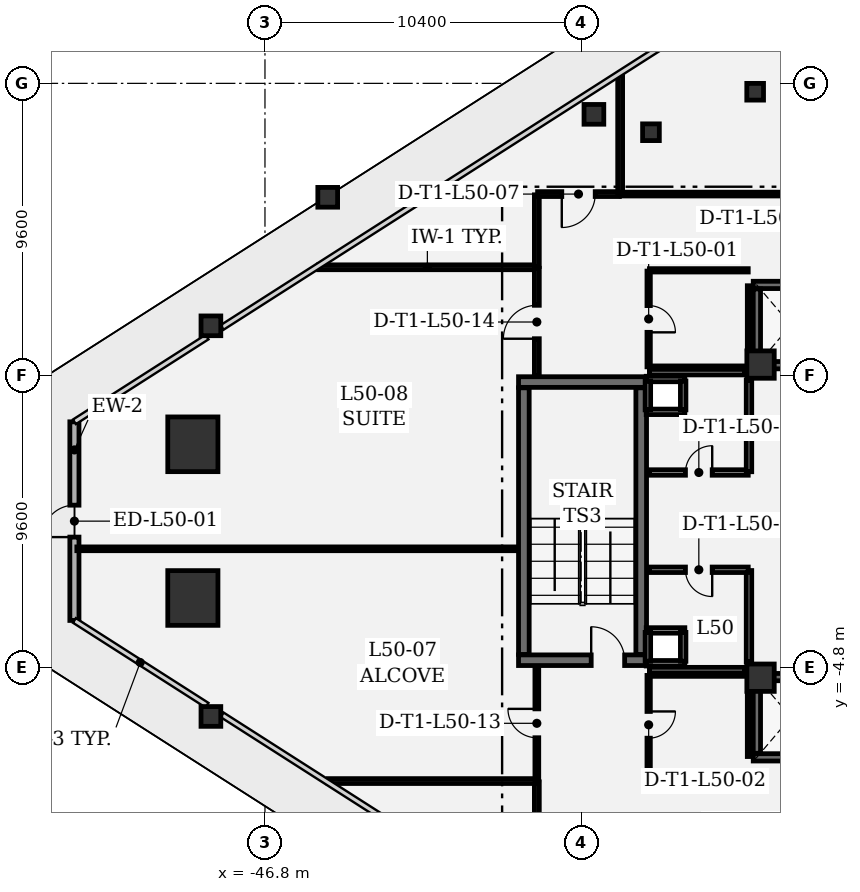
"""IFC4 building model, lengths in metres.
Left out: names, types, materials, properties, quantities, classifications, styles, units other than length and angle.
Written with IfcOpenShell. Run it as: python <this file> out.ifc"""

import sys

from ifc_helpers import new_model, si_unit, direction, frame, frame_2d, origin, origin_2d, place, context, subcontext, project, spatial, rectangle, extrude, element, fill, save


model = new_model("IFC4")
c1 = context("Model", 3, precision=1e-05, world=origin(), true_north=direction((0.0, 1.0)))
c2 = subcontext(c1, "Body", "Model", "MODEL_VIEW")
j1 = project(units=[si_unit("LENGTHUNIT", "METRE"), si_unit("PLANEANGLEUNIT", "RADIAN")], contexts=[c1])
p1 = place(None, origin())
s1 = spatial("IfcSite", under=j1, at=p1, CompositionType="ELEMENT")
p2 = place(p1, origin())
s2 = spatial("IfcBuilding", under=s1, at=p2, CompositionType="ELEMENT")
p3 = place(p2, frame((0.0, 0.0, 217.2)))
s3 = spatial("IfcBuildingStorey", under=s2, at=p3, CompositionType="ELEMENT", Elevation=217.2)
for number, where, z_axis, x_axis in (
    (1, (-49.172, 2.528, 0.0), (0.0, 0.0, 1.0), (1.0, 0.0, 0.0)),
    (2, (-49.172, -2.528, 0.0), (0.0, 0.0, 1.0), (1.0, 0.0, 0.0)),
):
    element("IfcColumn", number, at=place(p3, frame(where, z_axis=z_axis, x_axis=x_axis)), inside=s3, PredefinedType="COLUMN", context=c2, shape_type="SweptSolid", body=[
        extrude(rectangle(XDim=1.65, YDim=1.8, at=origin_2d()), origin(), (0.0, 0.0, 1.0), 4.05),
    ])
for number, where, z_axis, x_axis in (
    (3, (-30.5, 5.15, 0.0), (0.0, 0.0, 1.0), (1.0, 0.0, 0.0)),
    (4, (-30.5, -5.15, 0.0), (0.0, 0.0, 1.0), (1.0, 0.0, 0.0)),
):
    element("IfcColumn", number, at=place(p3, frame(where, z_axis=z_axis, x_axis=x_axis)), inside=s3, PredefinedType="COLUMN", context=c2, shape_type="SweptSolid", body=[
        extrude(rectangle(XDim=0.9, YDim=0.9, at=origin_2d()), origin(), (0.0, 0.0, 1.0), 4.05),
    ])
for number, where, z_axis, x_axis in (
    (5, (-44.736, 10.652, 0.0), (0.0, 0.0, 1.0), (1.0, 0.0, 0.0)),
    (6, (-48.578, 6.425, 0.0), (0.0, 0.0, 1.0), (1.0, 0.0, 0.0)),
    (7, (-48.578, -6.425, 0.0), (0.0, 0.0, 1.0), (1.0, 0.0, 0.0)),
    (8, (-35.981, 13.381, 0.0), (0.0, 0.0, 1.0), (1.0, 0.0, 0.0)),
):
    element("IfcColumn", number, at=place(p3, frame(where, z_axis=z_axis, x_axis=x_axis)), inside=s3, PredefinedType="COLUMN", context=c2, shape_type="SweptSolid", body=[
        extrude(rectangle(XDim=0.65, YDim=0.65, at=origin_2d()), origin(), (0.0, 0.0, 1.0), 4.05),
    ])
for number, where, z_axis, x_axis in (
    (9, (-34.104, 12.792, 0.0), (0.0, 0.0, 1.0), (1.0, 0.0, 0.0)),
    (10, (-30.677, 14.124, 0.0), (0.0, 0.0, 1.0), (1.0, 0.0, 0.0)),
):
    element("IfcColumn", number, at=place(p3, frame(where, z_axis=z_axis, x_axis=x_axis)), inside=s3, PredefinedType="COLUMN", context=c2, shape_type="SweptSolid", body=[
        extrude(rectangle(XDim=0.55, YDim=0.55, at=origin_2d()), origin(), (0.0, 0.0, 1.0), 4.05),
    ])
p4 = place(p3, frame((-53.068, -3.267, 0.0), z_axis=(0.0, 0.0, 1.0), x_axis=(0.0, 1.0, 0.0)))
e11 = element("IfcWall", 11, at=p4, inside=s3, PredefinedType="SOLIDWALL", context=c2, shape_type="SweptSolid", body=[
    extrude(rectangle(XDim=6.534, YDim=0.3, at=frame_2d((3.267, 0.0))), origin(), (0.0, 0.0, 1.0), 3.78),
])
p5 = place(p4, frame((2.742, 0.0, 0.0)))
e12 = element("IfcOpeningElement", 12, at=p5, cuts=e11, PredefinedType="OPENING", context=c2, shape_type="SweptSolid", body=[
    extrude(rectangle(XDim=1.05, YDim=2.2, at=frame_2d((0.525, 1.1))), frame((0.0, 0.16, 0.0), z_axis=(0.0, -1.0, 0.0), x_axis=(1.0, 0.0, 0.0)), (0.0, 0.0, 1.0), 0.32),
])
p6 = place(p3, frame((-38.46, -4.575, 0.0), z_axis=(0.0, 0.0, 1.0), x_axis=(1.0, 0.0, 0.0)))
e13 = element("IfcWall", 13, at=p6, inside=s3, PredefinedType="SHEAR", context=c2, shape_type="SweptSolid", body=[
    extrude(rectangle(XDim=4.21, YDim=0.35, at=frame_2d((2.105, 0.0))), origin(), (0.0, 0.0, 1.0), 3.78),
])
p7 = place(p6, frame((2.39, 0.0, 0.0)))
e14 = element("IfcOpeningElement", 14, at=p7, cuts=e13, PredefinedType="OPENING", context=c2, shape_type="SweptSolid", body=[
    extrude(rectangle(XDim=1.1, YDim=2.2, at=frame_2d((0.55, 1.1))), frame((0.0, 0.185, 0.0), z_axis=(0.0, -1.0, 0.0), x_axis=(1.0, 0.0, 0.0)), (0.0, 0.0, 1.0), 0.37),
])
p8 = place(p3, frame((-34.25, 4.575, 0.0), z_axis=(0.0, 0.0, 1.0), x_axis=(-1.0, 0.0, 0.0)))
e15 = element("IfcWall", 15, at=p8, inside=s3, PredefinedType="SHEAR", context=c2, shape_type="SweptSolid", body=[
    extrude(rectangle(XDim=4.21, YDim=0.35, at=frame_2d((2.105, 0.0))), origin(), (0.0, 0.0, 1.0), 3.78),
])
for number, where, z_axis, x_axis in (
    (16, (-34.425, -4.385, 0.0), (0.0, 0.0, 1.0), (0.0, 1.0, 0.0)),
    (17, (-38.285, 4.385, 0.0), (0.0, 0.0, 1.0), (0.0, -1.0, 0.0)),
):
    element("IfcWall", number, at=place(p3, frame(where, z_axis=z_axis, x_axis=x_axis)), inside=s3, PredefinedType="SHEAR", context=c2, shape_type="SweptSolid", body=[
        extrude(rectangle(XDim=8.77, YDim=0.35, at=frame_2d((4.385, 0.0))), origin(), (0.0, 0.0, 1.0), 3.78),
    ])
for number, where, z_axis, x_axis in (
    (18, (-28.26, 5.13, 0.0), (0.0, 0.0, 1.0), (-1.0, 0.0, 0.0)),
    (19, (-30.74, 7.77, 0.0), (0.0, 0.0, 1.0), (1.0, 0.0, 0.0)),
):
    element("IfcWall", number, at=place(p3, frame(where, z_axis=z_axis, x_axis=x_axis)), inside=s3, PredefinedType="SHEAR", context=c2, shape_type="SweptSolid", body=[
        extrude(rectangle(XDim=2.48, YDim=0.24, at=frame_2d((1.24, 0.0))), origin(), (0.0, 0.0, 1.0), 3.78),
    ])
p9 = place(p3, frame((-30.62, 5.262, 0.0), z_axis=(0.0, 0.0, 1.0), x_axis=(0.0, 1.0, 0.0)))
e20 = element("IfcWall", 20, at=p9, inside=s3, PredefinedType="SHEAR", context=c2, shape_type="SweptSolid", body=[
    extrude(rectangle(XDim=2.376, YDim=0.24, at=frame_2d((1.188, 0.0))), origin(), (0.0, 0.0, 1.0), 3.78),
])
for number, where, z_axis, x_axis in (
    (21, (-28.26, -7.77, 0.0), (0.0, 0.0, 1.0), (-1.0, 0.0, 0.0)),
    (22, (-30.74, -5.13, 0.0), (0.0, 0.0, 1.0), (1.0, 0.0, 0.0)),
):
    element("IfcWall", number, at=place(p3, frame(where, z_axis=z_axis, x_axis=x_axis)), inside=s3, PredefinedType="SHEAR", context=c2, shape_type="SweptSolid", body=[
        extrude(rectangle(XDim=2.48, YDim=0.24, at=frame_2d((1.24, 0.0))), origin(), (0.0, 0.0, 1.0), 3.78),
    ])
p10 = place(p3, frame((-30.62, -7.638, 0.0), z_axis=(0.0, 0.0, 1.0), x_axis=(0.0, 1.0, 0.0)))
e23 = element("IfcWall", 23, at=p10, inside=s3, PredefinedType="SHEAR", context=c2, shape_type="SweptSolid", body=[
    extrude(rectangle(XDim=2.376, YDim=0.24, at=frame_2d((1.188, 0.0))), origin(), (0.0, 0.0, 1.0), 3.78),
])
for number, where, z_axis, x_axis in (
    (24, (-32.99, 3.595, 0.0), (0.0, 0.0, 1.0), (-1.0, 0.0, 0.0)),
    (25, (-34.26, 4.675, 0.0), (0.0, 0.0, 1.0), (1.0, 0.0, 0.0)),
):
    element("IfcWall", number, at=place(p3, frame(where, z_axis=z_axis, x_axis=x_axis)), inside=s3, PredefinedType="PARTITIONING", context=c2, shape_type="SweptSolid", body=[
        extrude(rectangle(XDim=1.27, YDim=0.18, at=frame_2d((0.635, 0.0))), origin(), (0.0, 0.0, 1.0), 3.78),
    ])
for number, where, z_axis, x_axis in (
    (26, (-34.205, 3.66, 0.0), (0.0, 0.0, 1.0), (0.0, 1.0, 0.0)),
    (27, (-33.045, 4.61, 0.0), (0.0, 0.0, 1.0), (0.0, -1.0, 0.0)),
):
    element("IfcWall", number, at=place(p3, frame(where, z_axis=z_axis, x_axis=x_axis)), inside=s3, PredefinedType="PARTITIONING", context=c2, shape_type="SweptSolid", body=[
        extrude(rectangle(XDim=0.95, YDim=0.18, at=frame_2d((0.475, 0.0))), origin(), (0.0, 0.0, 1.0), 3.78),
    ])
for number, where, z_axis, x_axis in (
    (28, (-32.99, -4.675, 0.0), (0.0, 0.0, 1.0), (-1.0, 0.0, 0.0)),
    (29, (-34.26, -3.595, 0.0), (0.0, 0.0, 1.0), (1.0, 0.0, 0.0)),
):
    element("IfcWall", number, at=place(p3, frame(where, z_axis=z_axis, x_axis=x_axis)), inside=s3, PredefinedType="PARTITIONING", context=c2, shape_type="SweptSolid", body=[
        extrude(rectangle(XDim=1.27, YDim=0.18, at=frame_2d((0.635, 0.0))), origin(), (0.0, 0.0, 1.0), 3.78),
    ])
for number, where, z_axis, x_axis in (
    (30, (-34.205, -4.61, 0.0), (0.0, 0.0, 1.0), (0.0, 1.0, 0.0)),
    (31, (-33.045, -3.66, 0.0), (0.0, 0.0, 1.0), (0.0, -1.0, 0.0)),
):
    element("IfcWall", number, at=place(p3, frame(where, z_axis=z_axis, x_axis=x_axis)), inside=s3, PredefinedType="PARTITIONING", context=c2, shape_type="SweptSolid", body=[
        extrude(rectangle(XDim=0.95, YDim=0.18, at=frame_2d((0.475, 0.0))), origin(), (0.0, 0.0, 1.0), 3.78),
    ])
p11 = place(p3, frame((-34.18, 8.225, 0.0), z_axis=(0.0, 0.0, 1.0), x_axis=(0.0, -1.0, 0.0)))
e32 = element("IfcWall", 32, at=p11, inside=s3, PredefinedType="PARTITIONING", context=c2, shape_type="SweptSolid", body=[
    extrude(rectangle(XDim=3.15, YDim=0.11, at=frame_2d((1.575, 0.0))), origin(), (0.0, 0.0, 1.0), 3.78),
])
p12 = place(p11, frame((1.135, 0.0, 0.0)))
e33 = element("IfcOpeningElement", 33, at=p12, cuts=e32, PredefinedType="OPENING", context=c2, shape_type="SweptSolid", body=[
    extrude(rectangle(XDim=0.88, YDim=2.1, at=frame_2d((0.44, 1.05))), frame((0.0, 0.065, 0.0), z_axis=(0.0, -1.0, 0.0), x_axis=(1.0, 0.0, 0.0)), (0.0, 0.0, 1.0), 0.13),
])
p13 = place(p3, frame((-34.155, 5.05, 0.0), z_axis=(0.0, 0.0, 1.0), x_axis=(1.0, 0.0, 0.0)))
e34 = element("IfcWall", 34, at=p13, inside=s3, PredefinedType="PARTITIONING", context=c2, shape_type="SweptSolid", body=[
    extrude(rectangle(XDim=3.14, YDim=0.11, at=frame_2d((1.57, 0.0))), origin(), (0.0, 0.0, 1.0), 3.78),
])
p14 = place(p3, frame((-30.88, 5.665, 0.0), z_axis=(0.0, 0.0, 1.0), x_axis=(0.0, 1.0, 0.0)))
e35 = element("IfcWall", 35, at=p14, inside=s3, PredefinedType="PARTITIONING", context=c2, shape_type="SweptSolid", body=[
    extrude(rectangle(XDim=2.078, YDim=0.11, at=frame_2d((1.039, 0.0))), origin(), (0.0, 0.0, 1.0), 3.78),
])
p15 = place(p3, frame((-30.905, 8.25, 0.0), z_axis=(0.0, 0.0, 1.0), x_axis=(-1.0, 0.0, 0.0)))
e36 = element("IfcWall", 36, at=p15, inside=s3, PredefinedType="PARTITIONING", context=c2, shape_type="SweptSolid", body=[
    extrude(rectangle(XDim=3.25, YDim=0.11, at=frame_2d((1.625, 0.0))), origin(), (0.0, 0.0, 1.0), 3.78),
])
p16 = place(p3, frame((-34.155, -8.35, 0.0), z_axis=(0.0, 0.0, 1.0), x_axis=(1.0, 0.0, 0.0)))
e37 = element("IfcWall", 37, at=p16, inside=s3, PredefinedType="PARTITIONING", context=c2, shape_type="SweptSolid", body=[
    extrude(rectangle(XDim=3.25, YDim=0.11, at=frame_2d((1.625, 0.0))), origin(), (0.0, 0.0, 1.0), 3.344),
])
p17 = place(p3, frame((-30.88, -7.743, 0.0), z_axis=(0.0, 0.0, 1.0), x_axis=(0.0, 1.0, 0.0)))
e38 = element("IfcWall", 38, at=p17, inside=s3, PredefinedType="PARTITIONING", context=c2, shape_type="SweptSolid", body=[
    extrude(rectangle(XDim=2.078, YDim=0.11, at=frame_2d((1.039, 0.0))), origin(), (0.0, 0.0, 1.0), 3.78),
])
p18 = place(p3, frame((-31.015, -5.05, 0.0), z_axis=(0.0, 0.0, 1.0), x_axis=(-1.0, 0.0, 0.0)))
e39 = element("IfcWall", 39, at=p18, inside=s3, PredefinedType="PARTITIONING", context=c2, shape_type="SweptSolid", body=[
    extrude(rectangle(XDim=3.14, YDim=0.11, at=frame_2d((1.57, 0.0))), origin(), (0.0, 0.0, 1.0), 3.78),
])
p19 = place(p3, frame((-34.18, -5.075, 0.0), z_axis=(0.0, 0.0, 1.0), x_axis=(0.0, -1.0, 0.0)))
e40 = element("IfcWall", 40, at=p19, inside=s3, PredefinedType="PARTITIONING", context=c2, shape_type="SweptSolid", body=[
    extrude(rectangle(XDim=3.25, YDim=0.11, at=frame_2d((1.625, 0.0))), origin(), (0.0, 0.0, 1.0), 3.78),
])
p20 = place(p19, frame((1.185, 0.0, 0.0)))
e41 = element("IfcOpeningElement", 41, at=p20, cuts=e40, PredefinedType="OPENING", context=c2, shape_type="SweptSolid", body=[
    extrude(rectangle(XDim=0.88, YDim=2.1, at=frame_2d((0.44, 1.05))), frame((0.0, 0.065, 0.0), z_axis=(0.0, -1.0, 0.0), x_axis=(1.0, 0.0, 0.0)), (0.0, 0.0, 1.0), 0.13),
])
p21 = place(p3, frame((-34.155, 1.6, 0.0), z_axis=(0.0, 0.0, 1.0), x_axis=(1.0, 0.0, 0.0)))
e42 = element("IfcWall", 42, at=p21, inside=s3, PredefinedType="PARTITIONING", context=c2, shape_type="SweptSolid", body=[
    extrude(rectangle(XDim=3.25, YDim=0.18, at=frame_2d((1.625, 0.0))), origin(), (0.0, 0.0, 1.0), 3.78),
])
p22 = place(p21, frame((1.185, 0.0, 0.0)))
e43 = element("IfcOpeningElement", 43, at=p22, cuts=e42, PredefinedType="OPENING", context=c2, shape_type="SweptSolid", body=[
    extrude(rectangle(XDim=0.88, YDim=2.1, at=frame_2d((0.44, 1.05))), frame((0.0, 0.1, 0.0), z_axis=(0.0, -1.0, 0.0), x_axis=(1.0, 0.0, 0.0)), (0.0, 0.0, 1.0), 0.2),
])
p23 = place(p3, frame((-30.88, 1.625, 0.0), z_axis=(0.0, 0.0, 1.0), x_axis=(0.0, 1.0, 0.0)))
e44 = element("IfcWall", 44, at=p23, inside=s3, PredefinedType="PARTITIONING", context=c2, shape_type="SweptSolid", body=[
    extrude(rectangle(XDim=3.01, YDim=0.18, at=frame_2d((1.505, 0.0))), origin(), (0.0, 0.0, 1.0), 3.78),
])
for number, where, z_axis, x_axis in (
    (45, (-31.015, 4.9, 0.0), (0.0, 0.0, 1.0), (-1.0, 0.0, 0.0)),
    (46, (-34.155, -4.9, 0.0), (0.0, 0.0, 1.0), (1.0, 0.0, 0.0)),
):
    element("IfcWall", number, at=place(p3, frame(where, z_axis=z_axis, x_axis=x_axis)), inside=s3, PredefinedType="PARTITIONING", context=c2, shape_type="SweptSolid", body=[
        extrude(rectangle(XDim=3.14, YDim=0.18, at=frame_2d((1.57, 0.0))), origin(), (0.0, 0.0, 1.0), 3.78),
    ])
p24 = place(p3, frame((-30.88, -4.635, 0.0), z_axis=(0.0, 0.0, 1.0), x_axis=(0.0, 1.0, 0.0)))
e47 = element("IfcWall", 47, at=p24, inside=s3, PredefinedType="PARTITIONING", context=c2, shape_type="SweptSolid", body=[
    extrude(rectangle(XDim=3.01, YDim=0.18, at=frame_2d((1.505, 0.0))), origin(), (0.0, 0.0, 1.0), 3.78),
])
p25 = place(p3, frame((-30.905, -1.6, 0.0), z_axis=(0.0, 0.0, 1.0), x_axis=(-1.0, 0.0, 0.0)))
e48 = element("IfcWall", 48, at=p25, inside=s3, PredefinedType="PARTITIONING", context=c2, shape_type="SweptSolid", body=[
    extrude(rectangle(XDim=3.25, YDim=0.18, at=frame_2d((1.625, 0.0))), origin(), (0.0, 0.0, 1.0), 3.78),
])
p26 = place(p25, frame((1.185, 0.0, 0.0)))
e49 = element("IfcOpeningElement", 49, at=p26, cuts=e48, PredefinedType="OPENING", context=c2, shape_type="SweptSolid", body=[
    extrude(rectangle(XDim=0.88, YDim=2.1, at=frame_2d((0.44, 1.05))), frame((0.0, 0.1, 0.0), z_axis=(0.0, -1.0, 0.0), x_axis=(1.0, 0.0, 0.0)), (0.0, 0.0, 1.0), 0.2),
])
p27 = place(p3, frame((-45.034, 8.35, 0.0), z_axis=(0.0, 0.0, 1.0), x_axis=(1.0, 0.0, 0.0)))
e50 = element("IfcWall", 50, at=p27, inside=s3, PredefinedType="PARTITIONING", context=c2, shape_type="SweptSolid", body=[
    extrude(rectangle(XDim=7.152, YDim=0.16, at=frame_2d((3.576, 0.0))), origin(), (0.0, 0.0, 1.0), 3.0),
])
p28 = place(p3, frame((-37.858, 8.375, 0.0), z_axis=(0.0, 0.0, 1.0), x_axis=(0.0, 1.0, 0.0)))
e51 = element("IfcWall", 51, at=p28, inside=s3, PredefinedType="PARTITIONING", context=c2, shape_type="SweptSolid", body=[
    extrude(rectangle(XDim=2.358, YDim=0.16, at=frame_2d((1.179, 0.0))), origin(), (0.0, 0.0, 1.0), 3.78),
])
p29 = place(p3, frame((-35.142, 10.758, 0.0), z_axis=(0.0, 0.0, 1.0), x_axis=(-1.0, 0.0, 0.0)))
e52 = element("IfcWall", 52, at=p29, inside=s3, PredefinedType="PARTITIONING", context=c2, shape_type="SweptSolid", body=[
    extrude(rectangle(XDim=2.691, YDim=0.16, at=frame_2d((1.345, 0.0))), origin(), (0.0, 0.0, 1.0), 3.0),
])
p30 = place(p29, frame((0.795, 0.0, 0.0)))
e53 = element("IfcOpeningElement", 53, at=p30, cuts=e52, PredefinedType="OPENING", context=c2, shape_type="SweptSolid", body=[
    extrude(rectangle(XDim=1.1, YDim=2.15, at=frame_2d((0.55, 1.075))), frame((0.0, 0.09, 0.0), z_axis=(0.0, -1.0, 0.0), x_axis=(1.0, 0.0, 0.0)), (0.0, 0.0, 1.0), 0.18),
])
p31 = place(p3, frame((-35.117, 10.783, 0.0), z_axis=(0.0, 0.0, 1.0), x_axis=(0.0, 1.0, 0.0)))
e54 = element("IfcWall", 54, at=p31, inside=s3, PredefinedType="PARTITIONING", context=c2, shape_type="SweptSolid", body=[
    extrude(rectangle(XDim=3.876, YDim=0.16, at=frame_2d((1.938, 0.0))), origin(), (0.0, 0.0, 1.0), 3.78),
])
p32 = place(p3, frame((-35.084, 10.758, 0.0), z_axis=(0.0, 0.0, 1.0), x_axis=(1.0, 0.0, 0.0)))
e55 = element("IfcWall", 55, at=p32, inside=s3, PredefinedType="PARTITIONING", context=c2, shape_type="SweptSolid", body=[
    extrude(rectangle(XDim=19.292, YDim=0.125, at=frame_2d((9.646, 0.0))), origin(), (0.0, 0.0, 1.0), 3.0),
])
p33 = place(p32, frame((9.171, 0.0, 0.0)))
e56 = element("IfcOpeningElement", 56, at=p33, cuts=e55, PredefinedType="OPENING", context=c2, shape_type="SweptSolid", body=[
    extrude(rectangle(XDim=0.95, YDim=2.15, at=frame_2d((0.475, 1.075))), frame((0.0, 0.073, 0.0), z_axis=(0.0, -1.0, 0.0), x_axis=(1.0, 0.0, 0.0)), (0.0, 0.0, 1.0), 0.145),
])
p34 = place(p3, frame((-37.858, -8.575, 0.0), z_axis=(0.0, 0.0, 1.0), x_axis=(0.0, -1.0, 0.0)))
e57 = element("IfcWall", 57, at=p34, inside=s3, PredefinedType="PARTITIONING", context=c2, shape_type="SweptSolid", body=[
    extrude(rectangle(XDim=2.358, YDim=0.16, at=frame_2d((1.179, 0.0))), origin(), (0.0, 0.0, 1.0), 3.78),
])
p35 = place(p3, frame((-37.883, -8.55, 0.0), z_axis=(0.0, 0.0, 1.0), x_axis=(-1.0, 0.0, 0.0)))
e58 = element("IfcWall", 58, at=p35, inside=s3, PredefinedType="PARTITIONING", context=c2, shape_type="SweptSolid", body=[
    extrude(rectangle(XDim=6.839, YDim=0.16, at=frame_2d((3.419, 0.0))), origin(), (0.0, 0.0, 1.0), 3.0),
])
p36 = place(p3, frame((-37.858, -8.517, 0.0), z_axis=(0.0, 0.0, 1.0), x_axis=(0.0, 1.0, 0.0)))
e59 = element("IfcWall", 59, at=p36, inside=s3, PredefinedType="PARTITIONING", context=c2, shape_type="SweptSolid", body=[
    extrude(rectangle(XDim=3.734, YDim=0.125, at=frame_2d((1.867, 0.0))), origin(), (0.0, 0.0, 1.0), 3.78),
])
p37 = place(p36, frame((1.392, 0.0, 0.0)))
e60 = element("IfcOpeningElement", 60, at=p37, cuts=e59, PredefinedType="OPENING", context=c2, shape_type="SweptSolid", body=[
    extrude(rectangle(XDim=0.95, YDim=2.15, at=frame_2d((0.475, 1.075))), frame((0.0, 0.073, 0.0), z_axis=(0.0, -1.0, 0.0), x_axis=(1.0, 0.0, 0.0)), (0.0, 0.0, 1.0), 0.145),
])
p38 = place(p3, frame((-38.493, -0.91, 0.0), z_axis=(0.0, 0.0, 1.0), x_axis=(-1.0, 0.0, 0.0)))
e61 = element("IfcWall", 61, at=p38, inside=s3, PredefinedType="PARTITIONING", context=c2, shape_type="SweptSolid", body=[
    extrude(rectangle(XDim=14.495, YDim=0.125, at=frame_2d((7.248, 0.0))), origin(), (0.0, 0.0, 1.0), 3.78),
])
p39 = place(p3, frame((-37.858, 4.783, 0.0), z_axis=(0.0, 0.0, 1.0), x_axis=(0.0, 1.0, 0.0)))
e62 = element("IfcWall", 62, at=p39, inside=s3, PredefinedType="PARTITIONING", context=c2, shape_type="SweptSolid", body=[
    extrude(rectangle(XDim=3.534, YDim=0.16, at=frame_2d((1.767, 0.0))), origin(), (0.0, 0.0, 1.0), 3.78),
])
p40 = place(p39, frame((1.217, 0.0, 0.0)))
e63 = element("IfcOpeningElement", 63, at=p40, cuts=e62, PredefinedType="OPENING", context=c2, shape_type="SweptSolid", body=[
    extrude(rectangle(XDim=1.1, YDim=2.15, at=frame_2d((0.55, 1.075))), frame((0.0, 0.09, 0.0), z_axis=(0.0, -1.0, 0.0), x_axis=(1.0, 0.0, 0.0)), (0.0, 0.0, 1.0), 0.18),
])
p41 = place(p5, origin())
e64 = element("IfcDoor", 64, at=p41, inside=s3, OperationType="SINGLE_SWING_LEFT", PredefinedType="DOOR", context=c2, shape_type="SweptSolid", body=[
    extrude(rectangle(XDim=1.05, YDim=2.2, at=frame_2d((0.525, 1.1))), frame((0.0, 0.025, 0.0), z_axis=(0.0, -1.0, 0.0), x_axis=(1.0, 0.0, 0.0)), (0.0, 0.0, 1.0), 0.05),
])
fill(e12, e64)
p42 = place(p7, origin())
e65 = element("IfcDoor", 65, at=p42, inside=s3, OperationType="SINGLE_SWING_LEFT", PredefinedType="DOOR", context=c2, shape_type="SweptSolid", body=[
    extrude(rectangle(XDim=1.1, YDim=2.2, at=frame_2d((0.55, 1.1))), frame((0.0, 0.025, 0.0), z_axis=(0.0, -1.0, 0.0), x_axis=(1.0, 0.0, 0.0)), (0.0, 0.0, 1.0), 0.05),
])
fill(e14, e65)
p43 = place(p12, origin())
e66 = element("IfcDoor", 66, at=p43, inside=s3, OperationType="SINGLE_SWING_RIGHT", PredefinedType="DOOR", context=c2, shape_type="SweptSolid", body=[
    extrude(rectangle(XDim=0.88, YDim=2.1, at=frame_2d((0.44, 1.05))), frame((0.0, 0.025, 0.0), z_axis=(0.0, -1.0, 0.0), x_axis=(1.0, 0.0, 0.0)), (0.0, 0.0, 1.0), 0.05),
])
fill(e33, e66)
p44 = place(p20, origin())
e67 = element("IfcDoor", 67, at=p44, inside=s3, OperationType="SINGLE_SWING_LEFT", PredefinedType="DOOR", context=c2, shape_type="SweptSolid", body=[
    extrude(rectangle(XDim=0.88, YDim=2.1, at=frame_2d((0.44, 1.05))), frame((0.0, 0.025, 0.0), z_axis=(0.0, -1.0, 0.0), x_axis=(1.0, 0.0, 0.0)), (0.0, 0.0, 1.0), 0.05),
])
fill(e41, e67)
p45 = place(p22, origin())
e68 = element("IfcDoor", 68, at=p45, inside=s3, OperationType="SINGLE_SWING_RIGHT", PredefinedType="DOOR", context=c2, shape_type="SweptSolid", body=[
    extrude(rectangle(XDim=0.88, YDim=2.1, at=frame_2d((0.44, 1.05))), frame((0.0, 0.025, 0.0), z_axis=(0.0, -1.0, 0.0), x_axis=(1.0, 0.0, 0.0)), (0.0, 0.0, 1.0), 0.05),
])
fill(e43, e68)
p46 = place(p26, origin())
e69 = element("IfcDoor", 69, at=p46, inside=s3, OperationType="SINGLE_SWING_LEFT", PredefinedType="DOOR", context=c2, shape_type="SweptSolid", body=[
    extrude(rectangle(XDim=0.88, YDim=2.1, at=frame_2d((0.44, 1.05))), frame((0.0, 0.025, 0.0), z_axis=(0.0, -1.0, 0.0), x_axis=(1.0, 0.0, 0.0)), (0.0, 0.0, 1.0), 0.05),
])
fill(e49, e69)
p47 = place(p30, origin())
e70 = element("IfcDoor", 70, at=p47, inside=s3, OperationType="SINGLE_SWING_RIGHT", PredefinedType="DOOR", context=c2, shape_type="SweptSolid", body=[
    extrude(rectangle(XDim=1.1, YDim=2.15, at=frame_2d((0.55, 1.075))), frame((0.0, 0.025, 0.0), z_axis=(0.0, -1.0, 0.0), x_axis=(1.0, 0.0, 0.0)), (0.0, 0.0, 1.0), 0.05),
])
fill(e53, e70)
p48 = place(p37, origin())
e71 = element("IfcDoor", 71, at=p48, inside=s3, OperationType="SINGLE_SWING_RIGHT", PredefinedType="DOOR", context=c2, shape_type="SweptSolid", body=[
    extrude(rectangle(XDim=0.95, YDim=2.15, at=frame_2d((0.475, 1.075))), frame((0.0, 0.025, 0.0), z_axis=(0.0, -1.0, 0.0), x_axis=(1.0, 0.0, 0.0)), (0.0, 0.0, 1.0), 0.05),
])
fill(e60, e71)
p49 = place(p40, origin())
e72 = element("IfcDoor", 72, at=p49, inside=s3, OperationType="SINGLE_SWING_LEFT", PredefinedType="DOOR", context=c2, shape_type="SweptSolid", body=[
    extrude(rectangle(XDim=1.1, YDim=2.15, at=frame_2d((0.55, 1.075))), frame((0.0, 0.025, 0.0), z_axis=(0.0, -1.0, 0.0), x_axis=(1.0, 0.0, 0.0)), (0.0, 0.0, 1.0), 0.05),
])
fill(e63, e72)
save(model, sys.argv[1])
